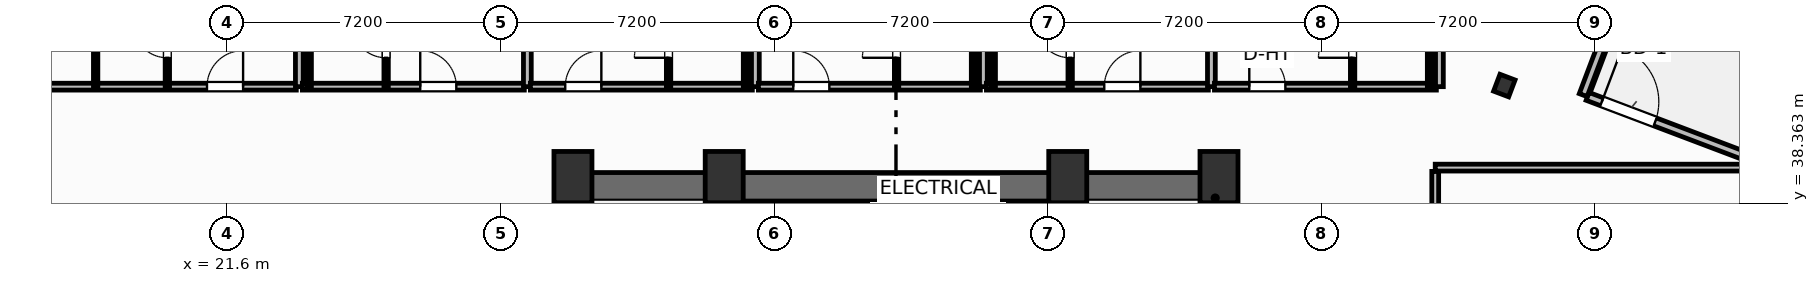
"""IFC4 building model, lengths in metres.
Left out: names, types, materials, properties, quantities, classifications, styles, units other than length and angle.
Written with IfcOpenShell. Run it as: python <this file> out.ifc"""

import sys

from ifc_helpers import new_model, si_unit, direction, frame, frame_2d, origin, origin_2d, place, context, subcontext, project, spatial, rectangle, i_section, extrude, element, fill, save


model = new_model("IFC4")
c1 = context("Model", 3, precision=1e-05, world=origin(), true_north=direction((0.0, 1.0)))
c2 = subcontext(c1, "Body", "Model", "MODEL_VIEW")
j1 = project(units=[si_unit("LENGTHUNIT", "METRE"), si_unit("PLANEANGLEUNIT", "RADIAN")], contexts=[c1])
p1 = place(None, origin())
s1 = spatial("IfcSite", under=j1, at=p1, CompositionType="ELEMENT")
p2 = place(p1, origin())
s2 = spatial("IfcBuilding", under=s1, at=p2, CompositionType="ELEMENT")
p3 = place(p2, frame((0.0, 0.0, 87.3)))
s3 = spatial("IfcBuildingStorey", under=s2, at=p3, CompositionType="ELEMENT", Elevation=87.3)
for number, where, z_axis, x_axis in (
    (1, (30.7, 39.05, 0.0), (0.0, 0.0, 1.0), (1.0, 0.0, 0.0)),
    (2, (34.68, 39.05, 0.0), (0.0, 0.0, 1.0), (1.0, 0.0, 0.0)),
    (3, (43.72, 39.05, 0.0), (0.0, 0.0, 1.0), (1.0, 0.0, 0.0)),
    (4, (47.7, 39.05, 0.0), (0.0, 0.0, 1.0), (1.0, 0.0, 0.0)),
):
    element("IfcColumn", number, at=place(p3, frame(where, z_axis=z_axis, x_axis=x_axis)), inside=s3, PredefinedType="COLUMN", context=c2, shape_type="SweptSolid", body=[
        extrude(rectangle(XDim=1.0, YDim=1.35, at=origin_2d()), origin(), (0.0, 0.0, 1.0), 3.7),
    ])
p4 = place(p3, frame((30.38, 38.795, 0.0), z_axis=(0.0, 0.0, 1.0), x_axis=(1.0, 0.0, 0.0)))
e5 = element("IfcWall", 5, at=p4, inside=s3, PredefinedType="SHEAR", context=c2, shape_type="SweptSolid", body=[
    extrude(rectangle(XDim=17.64, YDim=0.75, at=frame_2d((8.82, 0.0))), origin(), (0.0, 0.0, 1.0), 3.45),
])
for number, where, z_axis, x_axis in (
    (6, (30.755, 29.2, 0.0), (0.0, 0.0, 1.0), (0.0, 1.0, 0.0)),
    (7, (47.645, 29.2, 0.0), (0.0, 0.0, 1.0), (0.0, 1.0, 0.0)),
):
    element("IfcWall", number, at=place(p3, frame(where, z_axis=z_axis, x_axis=x_axis)), inside=s3, PredefinedType="SHEAR", context=c2, shape_type="SweptSolid", body=[
        extrude(rectangle(XDim=9.22, YDim=0.75, at=frame_2d((4.61, 0.0))), origin(), (0.0, 0.0, 1.0), 3.45),
    ])
p5 = place(p3, frame((34.64, 29.2, 0.0), z_axis=(0.0, 0.0, 1.0), x_axis=(0.0, 1.0, 0.0)))
e8 = element("IfcWall", 8, at=p5, inside=s3, PredefinedType="SHEAR", context=c2, shape_type="SweptSolid", body=[
    extrude(rectangle(XDim=9.22, YDim=0.25, at=frame_2d((4.61, 0.0))), origin(), (0.0, 0.0, 1.0), 3.45),
])
p6 = place(p5, frame((0.65, 0.0, 0.0)))
e9 = element("IfcOpeningElement", 9, at=p6, cuts=e8, PredefinedType="OPENING", context=c2, shape_type="SweptSolid", body=[
    extrude(rectangle(XDim=1.05, YDim=2.15, at=frame_2d((0.525, 1.075))), frame((0.0, 0.135, 0.0), z_axis=(0.0, -1.0, 0.0), x_axis=(1.0, 0.0, 0.0)), (0.0, 0.0, 1.0), 0.27),
])
p7 = place(p3, frame((43.76, 29.2, 0.0), z_axis=(0.0, 0.0, 1.0), x_axis=(0.0, 1.0, 0.0)))
e10 = element("IfcWall", 10, at=p7, inside=s3, PredefinedType="SHEAR", context=c2, shape_type="SweptSolid", body=[
    extrude(rectangle(XDim=9.22, YDim=0.25, at=frame_2d((4.61, 0.0))), origin(), (0.0, 0.0, 1.0), 3.45),
])
p8 = place(p7, frame((0.65, 0.0, 0.0)))
e11 = element("IfcOpeningElement", 11, at=p8, cuts=e10, PredefinedType="OPENING", context=c2, shape_type="SweptSolid", body=[
    extrude(rectangle(XDim=1.05, YDim=2.15, at=frame_2d((0.525, 1.075))), frame((0.0, 0.135, 0.0), z_axis=(0.0, -1.0, 0.0), x_axis=(1.0, 0.0, 0.0)), (0.0, 0.0, 1.0), 0.27),
])
p9 = place(p3, frame((55.208, 41.459, 0.0), z_axis=(0.0, 0.0, 1.0), x_axis=(0.935221751401, -0.354062530786, 0.0)))
e12 = element("IfcColumn", 12, at=p9, inside=s3, PredefinedType="COLUMN", context=c2, shape_type="SweptSolid", body=[
    extrude(i_section(OverallWidth=0.424, OverallDepth=0.474, WebThickness=0.048, FlangeThickness=0.077, FilletRadius=0.025, at=origin_2d()), origin(), (0.0, 0.0, 1.0), 3.7),
])
p10 = place(p3, frame((57.399, 41.175, 0.0), z_axis=(0.0, 0.0, 1.0), x_axis=(0.935227640088, -0.354046976001, 0.0)))
e13 = element("IfcWall", 13, at=p10, inside=s3, PredefinedType="SOLIDWALL", context=c2, shape_type="SweptSolid", body=[
    extrude(rectangle(XDim=6.0, YDim=0.22, at=frame_2d((3.0, 0.0))), origin(), (0.0, 0.0, 1.0), 2.73),
])
p11 = place(p10, frame((0.4, 0.0, 0.0)))
e14 = element("IfcOpeningElement", 14, at=p11, cuts=e13, PredefinedType="OPENING", context=c2, shape_type="SweptSolid", body=[
    extrude(rectangle(XDim=1.5, YDim=2.25, at=frame_2d((0.75, 1.125))), frame((0.0, 0.12, 0.0), z_axis=(0.0, -1.0, 0.0), x_axis=(1.0, 0.0, 0.0)), (0.0, 0.0, 1.0), 0.24),
])
p12 = place(p3, frame((57.284, 41.208, 0.0), z_axis=(0.0, 0.0, 1.0), x_axis=(0.354128469405, 0.935196785258, 0.0)))
e15 = element("IfcWall", 15, at=p12, inside=s3, PredefinedType="SOLIDWALL", context=c2, shape_type="SweptSolid", body=[
    extrude(rectangle(XDim=2.1, YDim=0.22, at=frame_2d((1.05, 0.0))), origin(), (0.0, 0.0, 1.0), 2.73),
])
p13 = place(p3, frame((5.506, 41.43, 0.0), z_axis=(0.0, 0.0, 1.0), x_axis=(1.0, 0.0, 0.0)))
e16 = element("IfcWall", 16, at=p13, inside=s3, PredefinedType="PARTITIONING", context=c2, shape_type="SweptSolid", body=[
    extrude(rectangle(XDim=17.914, YDim=0.18, at=frame_2d((8.957, 0.0))), origin(), (0.0, 0.0, 1.0), 3.45),
])
p14 = place(p13, frame((15.564, 0.0, 0.0)))
e17 = element("IfcOpeningElement", 17, at=p14, cuts=e16, PredefinedType="OPENING", context=c2, shape_type="SweptSolid", body=[
    extrude(rectangle(XDim=0.95, YDim=2.15, at=frame_2d((0.475, 1.075))), frame((0.0, 0.1, 0.0), z_axis=(0.0, -1.0, 0.0), x_axis=(1.0, 0.0, 0.0)), (0.0, 0.0, 1.0), 0.2),
])
p15 = place(p3, frame((20.027, 41.43, 0.0), z_axis=(0.0, 0.0, 1.0), x_axis=(0.0, 1.0, 0.0)))
e18 = element("IfcWall", 18, at=p15, inside=s3, PredefinedType="PARTITIONING", context=c2, shape_type="SweptSolid", body=[
    extrude(rectangle(XDim=2.52, YDim=0.115, at=frame_2d((1.26, 0.0))), origin(), (0.0, 0.0, 1.0), 3.45),
])
p16 = place(p15, frame((0.76, 0.0, 0.0)))
e19 = element("IfcOpeningElement", 19, at=p16, cuts=e18, PredefinedType="OPENING", context=c2, shape_type="SweptSolid", body=[
    extrude(rectangle(XDim=0.9, YDim=2.05, at=frame_2d((0.45, 1.025))), frame((0.0, 0.067, 0.0), z_axis=(0.0, -1.0, 0.0), x_axis=(1.0, 0.0, 0.0)), (0.0, 0.0, 1.0), 0.135),
])
p17 = place(p3, frame((18.14, 41.43, 0.0), z_axis=(0.0, 0.0, 1.0), x_axis=(0.0, 1.0, 0.0)))
e20 = element("IfcWall", 20, at=p17, inside=s3, PredefinedType="PARTITIONING", context=c2, shape_type="SweptSolid", body=[
    extrude(rectangle(XDim=2.52, YDim=0.115, at=frame_2d((1.26, 0.0))), origin(), (0.0, 0.0, 1.0), 3.45),
])
p18 = place(p3, frame((23.5, 41.43, 0.0), z_axis=(0.0, 0.0, 1.0), x_axis=(0.0, 1.0, 0.0)))
e21 = element("IfcWall", 21, at=p18, inside=s3, PredefinedType="PARTITIONING", context=c2, shape_type="SweptSolid", body=[
    extrude(rectangle(XDim=14.708, YDim=0.205, at=frame_2d((7.354, 0.0))), origin(), (0.0, 0.0, 1.0), 3.45),
])
p19 = place(p3, frame((23.58, 41.43, 0.0), z_axis=(0.0, 0.0, 1.0), x_axis=(1.0, 0.0, 0.0)))
e22 = element("IfcWall", 22, at=p19, inside=s3, PredefinedType="PARTITIONING", context=c2, shape_type="SweptSolid", body=[
    extrude(rectangle(XDim=5.84, YDim=0.18, at=frame_2d((2.92, 0.0))), origin(), (0.0, 0.0, 1.0), 3.45),
])
p20 = place(p19, frame((3.101, 0.0, 0.0)))
e23 = element("IfcOpeningElement", 23, at=p20, cuts=e22, PredefinedType="OPENING", context=c2, shape_type="SweptSolid", body=[
    extrude(rectangle(XDim=0.95, YDim=2.15, at=frame_2d((0.475, 1.075))), frame((0.0, 0.1, 0.0), z_axis=(0.0, -1.0, 0.0), x_axis=(1.0, 0.0, 0.0)), (0.0, 0.0, 1.0), 0.2),
])
p21 = place(p3, frame((25.784, 41.43, 0.0), z_axis=(0.0, 0.0, 1.0), x_axis=(0.0, 1.0, 0.0)))
e24 = element("IfcWall", 24, at=p21, inside=s3, PredefinedType="PARTITIONING", context=c2, shape_type="SweptSolid", body=[
    extrude(rectangle(XDim=2.52, YDim=0.115, at=frame_2d((1.26, 0.0))), origin(), (0.0, 0.0, 1.0), 3.45),
])
p22 = place(p21, frame((0.76, 0.0, 0.0)))
e25 = element("IfcOpeningElement", 25, at=p22, cuts=e24, PredefinedType="OPENING", context=c2, shape_type="SweptSolid", body=[
    extrude(rectangle(XDim=0.9, YDim=2.05, at=frame_2d((0.45, 1.025))), frame((0.0, 0.067, 0.0), z_axis=(0.0, -1.0, 0.0), x_axis=(1.0, 0.0, 0.0)), (0.0, 0.0, 1.0), 0.135),
])
p23 = place(p3, frame((23.76, 41.43, 0.0), z_axis=(0.0, 0.0, 1.0), x_axis=(0.0, 1.0, 0.0)))
e26 = element("IfcWall", 26, at=p23, inside=s3, PredefinedType="PARTITIONING", context=c2, shape_type="SweptSolid", body=[
    extrude(rectangle(XDim=2.52, YDim=0.115, at=frame_2d((1.26, 0.0))), origin(), (0.0, 0.0, 1.0), 3.45),
])
p24 = place(p3, frame((29.5, 41.43, 0.0), z_axis=(0.0, 0.0, 1.0), x_axis=(0.0, 1.0, 0.0)))
e27 = element("IfcWall", 27, at=p24, inside=s3, PredefinedType="PARTITIONING", context=c2, shape_type="SweptSolid", body=[
    extrude(rectangle(XDim=12.52, YDim=0.205, at=frame_2d((6.26, 0.0))), origin(), (0.0, 0.0, 1.0), 2.58),
])
p25 = place(p3, frame((29.58, 41.43, 0.0), z_axis=(0.0, 0.0, 1.0), x_axis=(1.0, 0.0, 0.0)))
e28 = element("IfcWall", 28, at=p25, inside=s3, PredefinedType="PARTITIONING", context=c2, shape_type="SweptSolid", body=[
    extrude(rectangle(XDim=5.84, YDim=0.18, at=frame_2d((2.92, 0.0))), origin(), (0.0, 0.0, 1.0), 3.45),
])
p26 = place(p25, frame((0.917, 0.0, 0.0)))
e29 = element("IfcOpeningElement", 29, at=p26, cuts=e28, PredefinedType="OPENING", context=c2, shape_type="SweptSolid", body=[
    extrude(rectangle(XDim=0.95, YDim=2.15, at=frame_2d((0.475, 1.075))), frame((0.0, 0.1, 0.0), z_axis=(0.0, -1.0, 0.0), x_axis=(1.0, 0.0, 0.0)), (0.0, 0.0, 1.0), 0.2),
])
p27 = place(p3, frame((33.216, 41.43, 0.0), z_axis=(0.0, 0.0, 1.0), x_axis=(0.0, 1.0, 0.0)))
e30 = element("IfcWall", 30, at=p27, inside=s3, PredefinedType="PARTITIONING", context=c2, shape_type="SweptSolid", body=[
    extrude(rectangle(XDim=2.52, YDim=0.115, at=frame_2d((1.26, 0.0))), origin(), (0.0, 0.0, 1.0), 3.45),
])
p28 = place(p27, frame((0.76, 0.0, 0.0)))
e31 = element("IfcOpeningElement", 31, at=p28, cuts=e30, PredefinedType="OPENING", context=c2, shape_type="SweptSolid", body=[
    extrude(rectangle(XDim=0.9, YDim=2.05, at=frame_2d((0.45, 1.025))), frame((0.0, 0.067, 0.0), z_axis=(0.0, -1.0, 0.0), x_axis=(1.0, 0.0, 0.0)), (0.0, 0.0, 1.0), 0.135),
])
p29 = place(p3, frame((35.24, 41.43, 0.0), z_axis=(0.0, 0.0, 1.0), x_axis=(0.0, 1.0, 0.0)))
e32 = element("IfcWall", 32, at=p29, inside=s3, PredefinedType="PARTITIONING", context=c2, shape_type="SweptSolid", body=[
    extrude(rectangle(XDim=2.52, YDim=0.115, at=frame_2d((1.26, 0.0))), origin(), (0.0, 0.0, 1.0), 3.45),
])
p30 = place(p3, frame((35.5, 41.43, 0.0), z_axis=(0.0, 0.0, 1.0), x_axis=(0.0, 1.0, 0.0)))
e33 = element("IfcWall", 33, at=p30, inside=s3, PredefinedType="PARTITIONING", context=c2, shape_type="SweptSolid", body=[
    extrude(rectangle(XDim=8.003, YDim=0.205, at=frame_2d((4.002, 0.0))), origin(), (0.0, 0.0, 1.0), 3.45),
])
p31 = place(p3, frame((35.58, 41.43, 0.0), z_axis=(0.0, 0.0, 1.0), x_axis=(1.0, 0.0, 0.0)))
e34 = element("IfcWall", 34, at=p31, inside=s3, PredefinedType="PARTITIONING", context=c2, shape_type="SweptSolid", body=[
    extrude(rectangle(XDim=5.84, YDim=0.18, at=frame_2d((2.92, 0.0))), origin(), (0.0, 0.0, 1.0), 3.45),
])
p32 = place(p31, frame((0.917, 0.0, 0.0)))
e35 = element("IfcOpeningElement", 35, at=p32, cuts=e34, PredefinedType="OPENING", context=c2, shape_type="SweptSolid", body=[
    extrude(rectangle(XDim=0.95, YDim=2.15, at=frame_2d((0.475, 1.075))), frame((0.0, 0.1, 0.0), z_axis=(0.0, -1.0, 0.0), x_axis=(1.0, 0.0, 0.0)), (0.0, 0.0, 1.0), 0.2),
])
p33 = place(p3, frame((39.216, 41.43, 0.0), z_axis=(0.0, 0.0, 1.0), x_axis=(0.0, 1.0, 0.0)))
e36 = element("IfcWall", 36, at=p33, inside=s3, PredefinedType="PARTITIONING", context=c2, shape_type="SweptSolid", body=[
    extrude(rectangle(XDim=2.52, YDim=0.115, at=frame_2d((1.26, 0.0))), origin(), (0.0, 0.0, 1.0), 3.45),
])
p34 = place(p33, frame((0.76, 0.0, 0.0)))
e37 = element("IfcOpeningElement", 37, at=p34, cuts=e36, PredefinedType="OPENING", context=c2, shape_type="SweptSolid", body=[
    extrude(rectangle(XDim=0.9, YDim=2.05, at=frame_2d((0.45, 1.025))), frame((0.0, 0.067, 0.0), z_axis=(0.0, -1.0, 0.0), x_axis=(1.0, 0.0, 0.0)), (0.0, 0.0, 1.0), 0.135),
])
p35 = place(p3, frame((41.24, 41.43, 0.0), z_axis=(0.0, 0.0, 1.0), x_axis=(0.0, 1.0, 0.0)))
e38 = element("IfcWall", 38, at=p35, inside=s3, PredefinedType="PARTITIONING", context=c2, shape_type="SweptSolid", body=[
    extrude(rectangle(XDim=2.52, YDim=0.115, at=frame_2d((1.26, 0.0))), origin(), (0.0, 0.0, 1.0), 3.45),
])
p36 = place(p3, frame((41.5, 41.43, 0.0), z_axis=(0.0, 0.0, 1.0), x_axis=(0.0, 1.0, 0.0)))
e39 = element("IfcWall", 39, at=p36, inside=s3, PredefinedType="PARTITIONING", context=c2, shape_type="SweptSolid", body=[
    extrude(rectangle(XDim=7.977, YDim=0.205, at=frame_2d((3.989, 0.0))), origin(), (0.0, 0.0, 1.0), 3.45),
])
p37 = place(p3, frame((41.58, 41.43, 0.0), z_axis=(0.0, 0.0, 1.0), x_axis=(1.0, 0.0, 0.0)))
e40 = element("IfcWall", 40, at=p37, inside=s3, PredefinedType="PARTITIONING", context=c2, shape_type="SweptSolid", body=[
    extrude(rectangle(XDim=5.84, YDim=0.18, at=frame_2d((2.92, 0.0))), origin(), (0.0, 0.0, 1.0), 3.45),
])
p38 = place(p37, frame((3.101, 0.0, 0.0)))
e41 = element("IfcOpeningElement", 41, at=p38, cuts=e40, PredefinedType="OPENING", context=c2, shape_type="SweptSolid", body=[
    extrude(rectangle(XDim=0.95, YDim=2.15, at=frame_2d((0.475, 1.075))), frame((0.0, 0.1, 0.0), z_axis=(0.0, -1.0, 0.0), x_axis=(1.0, 0.0, 0.0)), (0.0, 0.0, 1.0), 0.2),
])
p39 = place(p3, frame((43.784, 41.43, 0.0), z_axis=(0.0, 0.0, 1.0), x_axis=(0.0, 1.0, 0.0)))
e42 = element("IfcWall", 42, at=p39, inside=s3, PredefinedType="PARTITIONING", context=c2, shape_type="SweptSolid", body=[
    extrude(rectangle(XDim=2.52, YDim=0.115, at=frame_2d((1.26, 0.0))), origin(), (0.0, 0.0, 1.0), 3.45),
])
p40 = place(p39, frame((0.76, 0.0, 0.0)))
e43 = element("IfcOpeningElement", 43, at=p40, cuts=e42, PredefinedType="OPENING", context=c2, shape_type="SweptSolid", body=[
    extrude(rectangle(XDim=0.9, YDim=2.05, at=frame_2d((0.45, 1.025))), frame((0.0, 0.067, 0.0), z_axis=(0.0, -1.0, 0.0), x_axis=(1.0, 0.0, 0.0)), (0.0, 0.0, 1.0), 0.135),
])
p41 = place(p3, frame((41.76, 41.43, 0.0), z_axis=(0.0, 0.0, 1.0), x_axis=(0.0, 1.0, 0.0)))
e44 = element("IfcWall", 44, at=p41, inside=s3, PredefinedType="PARTITIONING", context=c2, shape_type="SweptSolid", body=[
    extrude(rectangle(XDim=2.52, YDim=0.115, at=frame_2d((1.26, 0.0))), origin(), (0.0, 0.0, 1.0), 3.45),
])
p42 = place(p3, frame((47.5, 41.43, 0.0), z_axis=(0.0, 0.0, 1.0), x_axis=(0.0, 1.0, 0.0)))
e45 = element("IfcWall", 45, at=p42, inside=s3, PredefinedType="PARTITIONING", context=c2, shape_type="SweptSolid", body=[
    extrude(rectangle(XDim=3.46, YDim=0.205, at=frame_2d((1.73, 0.0))), origin(), (0.0, 0.0, 1.0), 3.45),
])
p43 = place(p3, frame((47.58, 41.43, 0.0), z_axis=(0.0, 0.0, 1.0), x_axis=(1.0, 0.0, 0.0)))
e46 = element("IfcWall", 46, at=p43, inside=s3, PredefinedType="PARTITIONING", context=c2, shape_type="SweptSolid", body=[
    extrude(rectangle(XDim=5.84, YDim=0.18, at=frame_2d((2.92, 0.0))), origin(), (0.0, 0.0, 1.0), 3.45),
])
p44 = place(p43, frame((0.917, 0.0, 0.0)))
e47 = element("IfcOpeningElement", 47, at=p44, cuts=e46, PredefinedType="OPENING", context=c2, shape_type="SweptSolid", body=[
    extrude(rectangle(XDim=0.95, YDim=2.15, at=frame_2d((0.475, 1.075))), frame((0.0, 0.1, 0.0), z_axis=(0.0, -1.0, 0.0), x_axis=(1.0, 0.0, 0.0)), (0.0, 0.0, 1.0), 0.2),
])
p45 = place(p3, frame((51.216, 41.43, 0.0), z_axis=(0.0, 0.0, 1.0), x_axis=(0.0, 1.0, 0.0)))
e48 = element("IfcWall", 48, at=p45, inside=s3, PredefinedType="PARTITIONING", context=c2, shape_type="SweptSolid", body=[
    extrude(rectangle(XDim=2.52, YDim=0.115, at=frame_2d((1.26, 0.0))), origin(), (0.0, 0.0, 1.0), 3.45),
])
p46 = place(p45, frame((0.76, 0.0, 0.0)))
e49 = element("IfcOpeningElement", 49, at=p46, cuts=e48, PredefinedType="OPENING", context=c2, shape_type="SweptSolid", body=[
    extrude(rectangle(XDim=0.9, YDim=2.05, at=frame_2d((0.45, 1.025))), frame((0.0, 0.067, 0.0), z_axis=(0.0, -1.0, 0.0), x_axis=(1.0, 0.0, 0.0)), (0.0, 0.0, 1.0), 0.135),
])
p47 = place(p3, frame((53.24, 41.43, 0.0), z_axis=(0.0, 0.0, 1.0), x_axis=(0.0, 1.0, 0.0)))
e50 = element("IfcWall", 50, at=p47, inside=s3, PredefinedType="PARTITIONING", context=c2, shape_type="SweptSolid", body=[
    extrude(rectangle(XDim=2.52, YDim=0.115, at=frame_2d((1.26, 0.0))), origin(), (0.0, 0.0, 1.0), 3.45),
])
p48 = place(p3, frame((53.5, 41.43, 0.0), z_axis=(0.0, 0.0, 1.0), x_axis=(0.0, 1.0, 0.0)))
e51 = element("IfcWall", 51, at=p48, inside=s3, PredefinedType="PARTITIONING", context=c2, shape_type="SweptSolid", body=[
    extrude(rectangle(XDim=3.434, YDim=0.205, at=frame_2d((1.717, 0.0))), origin(), (0.0, 0.0, 1.0), 3.45),
])
p49 = place(p3, frame((53.39, 27.53, 0.0), z_axis=(0.0, 0.0, 1.0), x_axis=(0.0, 1.0, 0.0)))
e52 = element("IfcWall", 52, at=p49, inside=s3, PredefinedType="PARTITIONING", context=c2, shape_type="SweptSolid", body=[
    extrude(rectangle(XDim=11.67, YDim=0.18, at=frame_2d((5.835, 0.0))), origin(), (0.0, 0.0, 1.0), 3.45),
])
p50 = place(p49, frame((5.8, 0.0, 0.0)))
e53 = element("IfcOpeningElement", 53, at=p50, cuts=e52, PredefinedType="OPENING", context=c2, shape_type="SweptSolid", body=[
    extrude(rectangle(XDim=0.92, YDim=2.05, at=frame_2d((0.46, 1.025))), frame((0.0, 0.1, 0.0), z_axis=(0.0, -1.0, 0.0), x_axis=(1.0, 0.0, 0.0)), (0.0, 0.0, 1.0), 0.2),
])
p51 = place(p3, frame((53.39, 39.3, 0.0), z_axis=(0.0, 0.0, 1.0), x_axis=(1.0, 0.0, 0.0)))
e54 = element("IfcWall", 54, at=p51, inside=s3, PredefinedType="PARTITIONING", context=c2, shape_type="SweptSolid", body=[
    extrude(rectangle(XDim=8.876, YDim=0.18, at=frame_2d((4.438, 0.0))), origin(), (0.0, 0.0, 1.0), 3.45),
])
p52 = place(p11, origin())
e55 = element("IfcDoor", 55, at=p52, inside=s3, OperationType="SINGLE_SWING_LEFT", PredefinedType="DOOR", context=c2, shape_type="SweptSolid", body=[
    extrude(rectangle(XDim=1.5, YDim=2.25, at=frame_2d((0.75, 1.125))), frame((0.0, 0.025, 0.0), z_axis=(0.0, -1.0, 0.0), x_axis=(1.0, 0.0, 0.0)), (0.0, 0.0, 1.0), 0.05),
])
fill(e14, e55)
p53 = place(p14, origin())
e56 = element("IfcDoor", 56, at=p53, inside=s3, OperationType="SINGLE_SWING_RIGHT", PredefinedType="DOOR", context=c2, shape_type="SweptSolid", body=[
    extrude(rectangle(XDim=0.95, YDim=2.15, at=frame_2d((0.475, 1.075))), frame((0.0, 0.025, 0.0), z_axis=(0.0, -1.0, 0.0), x_axis=(1.0, 0.0, 0.0)), (0.0, 0.0, 1.0), 0.05),
])
fill(e17, e56)
p54 = place(p16, origin())
e57 = element("IfcDoor", 57, at=p54, inside=s3, OperationType="SINGLE_SWING_RIGHT", PredefinedType="DOOR", context=c2, shape_type="SweptSolid", body=[
    extrude(rectangle(XDim=0.9, YDim=2.05, at=frame_2d((0.45, 1.025))), frame((0.0, 0.025, 0.0), z_axis=(0.0, -1.0, 0.0), x_axis=(1.0, 0.0, 0.0)), (0.0, 0.0, 1.0), 0.05),
])
fill(e19, e57)
p55 = place(p20, origin())
e58 = element("IfcDoor", 58, at=p55, inside=s3, OperationType="SINGLE_SWING_LEFT", PredefinedType="DOOR", context=c2, shape_type="SweptSolid", body=[
    extrude(rectangle(XDim=0.95, YDim=2.15, at=frame_2d((0.475, 1.075))), frame((0.0, 0.025, 0.0), z_axis=(0.0, -1.0, 0.0), x_axis=(1.0, 0.0, 0.0)), (0.0, 0.0, 1.0), 0.05),
])
fill(e23, e58)
p56 = place(p22, origin())
e59 = element("IfcDoor", 59, at=p56, inside=s3, OperationType="SINGLE_SWING_RIGHT", PredefinedType="DOOR", context=c2, shape_type="SweptSolid", body=[
    extrude(rectangle(XDim=0.9, YDim=2.05, at=frame_2d((0.45, 1.025))), frame((0.0, 0.025, 0.0), z_axis=(0.0, -1.0, 0.0), x_axis=(1.0, 0.0, 0.0)), (0.0, 0.0, 1.0), 0.05),
])
fill(e25, e59)
p57 = place(p26, origin())
e60 = element("IfcDoor", 60, at=p57, inside=s3, OperationType="SINGLE_SWING_RIGHT", PredefinedType="DOOR", context=c2, shape_type="SweptSolid", body=[
    extrude(rectangle(XDim=0.95, YDim=2.15, at=frame_2d((0.475, 1.075))), frame((0.0, 0.025, 0.0), z_axis=(0.0, -1.0, 0.0), x_axis=(1.0, 0.0, 0.0)), (0.0, 0.0, 1.0), 0.05),
])
fill(e29, e60)
p58 = place(p28, origin())
e61 = element("IfcDoor", 61, at=p58, inside=s3, OperationType="SINGLE_SWING_LEFT", PredefinedType="DOOR", context=c2, shape_type="SweptSolid", body=[
    extrude(rectangle(XDim=0.9, YDim=2.05, at=frame_2d((0.45, 1.025))), frame((0.0, 0.025, 0.0), z_axis=(0.0, -1.0, 0.0), x_axis=(1.0, 0.0, 0.0)), (0.0, 0.0, 1.0), 0.05),
])
fill(e31, e61)
p59 = place(p32, origin())
e62 = element("IfcDoor", 62, at=p59, inside=s3, OperationType="SINGLE_SWING_LEFT", PredefinedType="DOOR", context=c2, shape_type="SweptSolid", body=[
    extrude(rectangle(XDim=0.95, YDim=2.15, at=frame_2d((0.475, 1.075))), frame((0.0, 0.025, 0.0), z_axis=(0.0, -1.0, 0.0), x_axis=(1.0, 0.0, 0.0)), (0.0, 0.0, 1.0), 0.05),
])
fill(e35, e62)
p60 = place(p34, origin())
e63 = element("IfcDoor", 63, at=p60, inside=s3, OperationType="SINGLE_SWING_LEFT", PredefinedType="DOOR", context=c2, shape_type="SweptSolid", body=[
    extrude(rectangle(XDim=0.9, YDim=2.05, at=frame_2d((0.45, 1.025))), frame((0.0, 0.025, 0.0), z_axis=(0.0, -1.0, 0.0), x_axis=(1.0, 0.0, 0.0)), (0.0, 0.0, 1.0), 0.05),
])
fill(e37, e63)
p61 = place(p38, origin())
e64 = element("IfcDoor", 64, at=p61, inside=s3, OperationType="SINGLE_SWING_RIGHT", PredefinedType="DOOR", context=c2, shape_type="SweptSolid", body=[
    extrude(rectangle(XDim=0.95, YDim=2.15, at=frame_2d((0.475, 1.075))), frame((0.0, 0.025, 0.0), z_axis=(0.0, -1.0, 0.0), x_axis=(1.0, 0.0, 0.0)), (0.0, 0.0, 1.0), 0.05),
])
fill(e41, e64)
p62 = place(p40, origin())
e65 = element("IfcDoor", 65, at=p62, inside=s3, OperationType="SINGLE_SWING_RIGHT", PredefinedType="DOOR", context=c2, shape_type="SweptSolid", body=[
    extrude(rectangle(XDim=0.9, YDim=2.05, at=frame_2d((0.45, 1.025))), frame((0.0, 0.025, 0.0), z_axis=(0.0, -1.0, 0.0), x_axis=(1.0, 0.0, 0.0)), (0.0, 0.0, 1.0), 0.05),
])
fill(e43, e65)
p63 = place(p44, origin())
e66 = element("IfcDoor", 66, at=p63, inside=s3, OperationType="SINGLE_SWING_LEFT", PredefinedType="DOOR", context=c2, shape_type="SweptSolid", body=[
    extrude(rectangle(XDim=0.95, YDim=2.15, at=frame_2d((0.475, 1.075))), frame((0.0, 0.025, 0.0), z_axis=(0.0, -1.0, 0.0), x_axis=(1.0, 0.0, 0.0)), (0.0, 0.0, 1.0), 0.05),
])
fill(e47, e66)
p64 = place(p46, origin())
e67 = element("IfcDoor", 67, at=p64, inside=s3, OperationType="SINGLE_SWING_LEFT", PredefinedType="DOOR", context=c2, shape_type="SweptSolid", body=[
    extrude(rectangle(XDim=0.9, YDim=2.05, at=frame_2d((0.45, 1.025))), frame((0.0, 0.025, 0.0), z_axis=(0.0, -1.0, 0.0), x_axis=(1.0, 0.0, 0.0)), (0.0, 0.0, 1.0), 0.05),
])
fill(e49, e67)
save(model, sys.argv[1])
